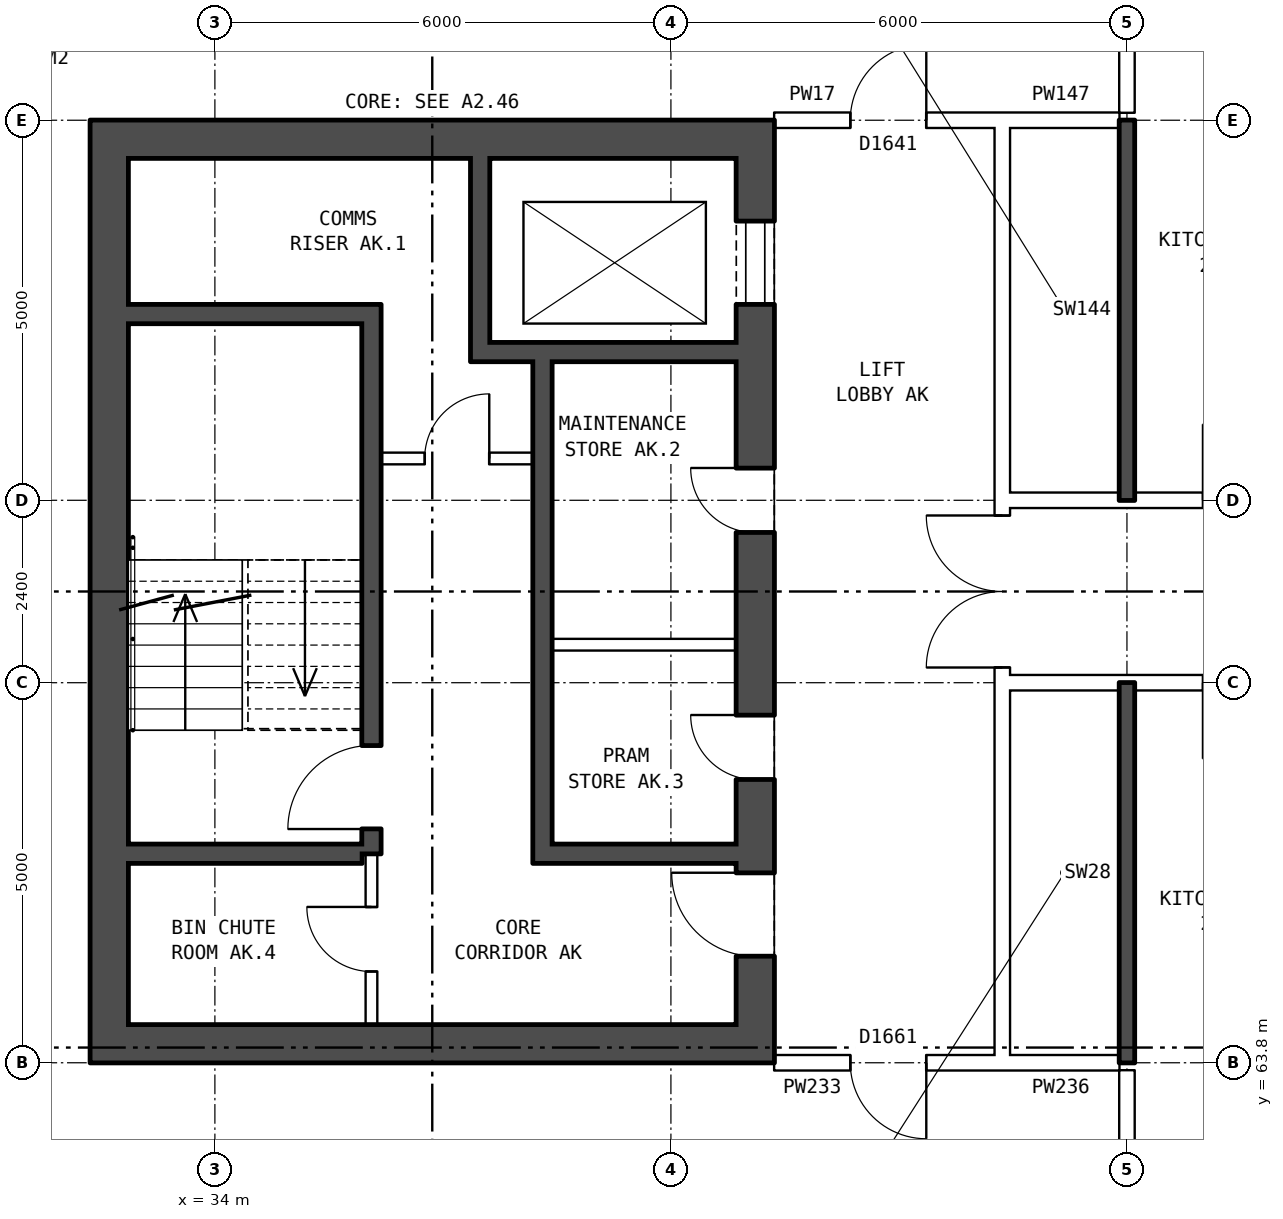
"""IFC4 building model, lengths in metres.
Left out: names, types, materials, properties, quantities, classifications, styles, units other than length and angle.
Written with IfcOpenShell. Run it as: python <this file> out.ifc"""

import sys

from ifc_helpers import new_model, si_unit, direction, frame, frame_2d, origin, place, context, subcontext, project, spatial, rectangle, extrude, element, fill, save


model = new_model("IFC4")
c1 = context("Model", 3, precision=1e-05, world=origin(), true_north=direction((0.0, 1.0)))
c2 = subcontext(c1, "Body", "Model", "MODEL_VIEW")
j1 = project(units=[si_unit("LENGTHUNIT", "METRE"), si_unit("PLANEANGLEUNIT", "RADIAN")], contexts=[c1])
p1 = place(None, origin())
s1 = spatial("IfcSite", under=j1, at=p1, CompositionType="ELEMENT")
p2 = place(p1, origin())
s2 = spatial("IfcBuilding", under=s1, at=p2, CompositionType="ELEMENT")
p3 = place(p2, frame((0.0, 0.0, 160.9)))
s3 = spatial("IfcBuildingStorey", under=s2, at=p3, CompositionType="ELEMENT", Elevation=160.9)
p4 = place(p3, frame((41.11, 76.2, 0.0), z_axis=(0.0, 0.0, 1.0), x_axis=(0.0, -1.0, 0.0)))
e1 = element("IfcWall", 1, at=p4, inside=s3, PredefinedType="SHEAR", context=c2, shape_type="SweptSolid", body=[
    extrude(rectangle(XDim=12.4, YDim=0.5, at=frame_2d((6.2, 0.0))), origin(), (0.0, 0.0, 1.0), 2.85),
])
p5 = place(p4, frame((1.325, 0.0, 0.0)))
e2 = element("IfcOpeningElement", 2, at=p5, cuts=e1, PredefinedType="OPENING", context=c2, shape_type="SweptSolid", body=[
    extrude(rectangle(XDim=1.1, YDim=2.1, at=frame_2d((0.55, 1.05))), frame((0.0, 0.26, 0.0), z_axis=(0.0, -1.0, 0.0), x_axis=(1.0, 0.0, 0.0)), (0.0, 0.0, 1.0), 0.52),
])
p6 = place(p4, frame((4.575, 0.0, 0.0)))
e3 = element("IfcOpeningElement", 3, at=p6, cuts=e1, PredefinedType="OPENING", context=c2, shape_type="SweptSolid", body=[
    extrude(rectangle(XDim=0.85, YDim=2.1, at=frame_2d((0.425, 1.05))), frame((0.0, 0.26, 0.0), z_axis=(0.0, -1.0, 0.0), x_axis=(1.0, 0.0, 0.0)), (0.0, 0.0, 1.0), 0.52),
])
p7 = place(p4, frame((7.825, 0.0, 0.0)))
e4 = element("IfcOpeningElement", 4, at=p7, cuts=e1, PredefinedType="OPENING", context=c2, shape_type="SweptSolid", body=[
    extrude(rectangle(XDim=0.85, YDim=2.1, at=frame_2d((0.425, 1.05))), frame((0.0, 0.26, 0.0), z_axis=(0.0, -1.0, 0.0), x_axis=(1.0, 0.0, 0.0)), (0.0, 0.0, 1.0), 0.52),
])
p8 = place(p4, frame((9.9, 0.0, 0.0)))
e5 = element("IfcOpeningElement", 5, at=p8, cuts=e1, PredefinedType="OPENING", context=c2, shape_type="SweptSolid", body=[
    extrude(rectangle(XDim=1.1, YDim=2.1, at=frame_2d((0.55, 1.05))), frame((0.0, 0.26, 0.0), z_axis=(0.0, -1.0, 0.0), x_axis=(1.0, 0.0, 0.0)), (0.0, 0.0, 1.0), 0.52),
])
p9 = place(p3, frame((32.61, 76.2, 0.0), z_axis=(0.0, 0.0, 1.0), x_axis=(0.0, -1.0, 0.0)))
e6 = element("IfcWall", 6, at=p9, inside=s3, PredefinedType="SHEAR", context=c2, shape_type="SweptSolid", body=[
    extrude(rectangle(XDim=12.4, YDim=0.5, at=frame_2d((6.2, 0.0))), origin(), (0.0, 0.0, 1.0), 2.85),
])
for number, where, z_axis, x_axis in (
    (7, (40.86, 75.95, 0.0), (0.0, 0.0, 1.0), (-1.0, 0.0, 0.0)),
    (8, (40.86, 64.05, 0.0), (0.0, 0.0, 1.0), (-1.0, 0.0, 0.0)),
):
    element("IfcWall", number, at=place(p3, frame(where, z_axis=z_axis, x_axis=x_axis)), inside=s3, PredefinedType="SHEAR", context=c2, shape_type="SweptSolid", body=[
        extrude(rectangle(XDim=8.0, YDim=0.5, at=frame_2d((4.0, 0.0))), origin(), (0.0, 0.0, 1.0), 2.85),
    ])
p10 = place(p3, frame((35.935, 73.65, 0.0), z_axis=(0.0, 0.0, 1.0), x_axis=(-1.0, 0.0, 0.0)))
e9 = element("IfcWall", 9, at=p10, inside=s3, PredefinedType="SHEAR", context=c2, shape_type="SweptSolid", body=[
    extrude(rectangle(XDim=3.075, YDim=0.25, at=frame_2d((1.538, 0.0))), origin(), (0.0, 0.0, 1.0), 2.85),
])
p11 = place(p3, frame((40.86, 73.15, 0.0), z_axis=(0.0, 0.0, 1.0), x_axis=(-1.0, 0.0, 0.0)))
e10 = element("IfcWall", 10, at=p11, inside=s3, PredefinedType="SHEAR", context=c2, shape_type="SweptSolid", body=[
    extrude(rectangle(XDim=3.495, YDim=0.25, at=frame_2d((1.748, 0.0))), origin(), (0.0, 0.0, 1.0), 2.85),
])
p12 = place(p3, frame((38.185, 71.75, 0.0), z_axis=(0.0, 0.0, 1.0), x_axis=(-1.0, 0.0, 0.0)))
e11 = element("IfcWall", 11, at=p12, inside=s3, PredefinedType="PARTITIONING", context=c2, shape_type="SweptSolid", body=[
    extrude(rectangle(XDim=2.0, YDim=0.15, at=frame_2d((1.0, 0.0))), origin(), (0.0, 0.0, 1.0), 2.85),
])
p13 = place(p12, frame((0.575, 0.0, 0.0)))
e12 = element("IfcOpeningElement", 12, at=p13, cuts=e11, PredefinedType="OPENING", context=c2, shape_type="SweptSolid", body=[
    extrude(rectangle(XDim=0.85, YDim=2.1, at=frame_2d((0.425, 1.05))), frame((0.0, 0.085, 0.0), z_axis=(0.0, -1.0, 0.0), x_axis=(1.0, 0.0, 0.0)), (0.0, 0.0, 1.0), 0.17),
])
p14 = place(p3, frame((40.86, 69.3, 0.0), z_axis=(0.0, 0.0, 1.0), x_axis=(-1.0, 0.0, 0.0)))
e13 = element("IfcWall", 13, at=p14, inside=s3, PredefinedType="PARTITIONING", context=c2, shape_type="SweptSolid", body=[
    extrude(rectangle(XDim=2.425, YDim=0.15, at=frame_2d((1.212, 0.0))), origin(), (0.0, 0.0, 1.0), 2.85),
])
p15 = place(p3, frame((40.86, 66.55, 0.0), z_axis=(0.0, 0.0, 1.0), x_axis=(-1.0, 0.0, 0.0)))
e14 = element("IfcWall", 14, at=p15, inside=s3, PredefinedType="SHEAR", context=c2, shape_type="SweptSolid", body=[
    extrude(rectangle(XDim=2.425, YDim=0.25, at=frame_2d((1.212, 0.0))), origin(), (0.0, 0.0, 1.0), 2.85),
])
p16 = place(p3, frame((35.935, 66.55, 0.0), z_axis=(0.0, 0.0, 1.0), x_axis=(-1.0, 0.0, 0.0)))
e15 = element("IfcWall", 15, at=p16, inside=s3, PredefinedType="SHEAR", context=c2, shape_type="SweptSolid", body=[
    extrude(rectangle(XDim=3.075, YDim=0.25, at=frame_2d((1.538, 0.0))), origin(), (0.0, 0.0, 1.0), 2.85),
])
p17 = place(p3, frame((38.31, 73.025, 0.0), z_axis=(0.0, 0.0, 1.0), x_axis=(0.0, -1.0, 0.0)))
e16 = element("IfcWall", 16, at=p17, inside=s3, PredefinedType="SHEAR", context=c2, shape_type="SweptSolid", body=[
    extrude(rectangle(XDim=6.6, YDim=0.25, at=frame_2d((3.3, 0.0))), origin(), (0.0, 0.0, 1.0), 2.85),
])
p18 = place(p3, frame((37.49, 75.7, 0.0), z_axis=(0.0, 0.0, 1.0), x_axis=(0.0, -1.0, 0.0)))
e17 = element("IfcWall", 17, at=p18, inside=s3, PredefinedType="SHEAR", context=c2, shape_type="SweptSolid", body=[
    extrude(rectangle(XDim=2.425, YDim=0.25, at=frame_2d((1.212, 0.0))), origin(), (0.0, 0.0, 1.0), 2.85),
])
p19 = place(p3, frame((36.06, 73.775, 0.0), z_axis=(0.0, 0.0, 1.0), x_axis=(0.0, -1.0, 0.0)))
e18 = element("IfcWall", 18, at=p19, inside=s3, PredefinedType="SHEAR", context=c2, shape_type="SweptSolid", body=[
    extrude(rectangle(XDim=7.225, YDim=0.25, at=frame_2d((3.612, 0.0))), origin(), (0.0, 0.0, 1.0), 2.85),
])
p20 = place(p19, frame((5.8, 0.0, 0.0)))
e19 = element("IfcOpeningElement", 19, at=p20, cuts=e18, PredefinedType="OPENING", context=c2, shape_type="SweptSolid", body=[
    extrude(rectangle(XDim=1.1, YDim=2.1, at=frame_2d((0.55, 1.05))), frame((0.0, 0.135, 0.0), z_axis=(0.0, -1.0, 0.0), x_axis=(1.0, 0.0, 0.0)), (0.0, 0.0, 1.0), 0.27),
])
p21 = place(p3, frame((36.06, 66.55, 0.0), z_axis=(0.0, 0.0, 1.0), x_axis=(0.0, -1.0, 0.0)))
e20 = element("IfcWall", 20, at=p21, inside=s3, PredefinedType="PARTITIONING", context=c2, shape_type="SweptSolid", body=[
    extrude(rectangle(XDim=2.25, YDim=0.15, at=frame_2d((1.125, 0.0))), origin(), (0.0, 0.0, 1.0), 2.85),
])
p22 = place(p21, frame((0.7, 0.0, 0.0)))
e21 = element("IfcOpeningElement", 21, at=p22, cuts=e20, PredefinedType="OPENING", context=c2, shape_type="SweptSolid", body=[
    extrude(rectangle(XDim=0.85, YDim=2.1, at=frame_2d((0.425, 1.05))), frame((0.0, 0.085, 0.0), z_axis=(0.0, -1.0, 0.0), x_axis=(1.0, 0.0, 0.0)), (0.0, 0.0, 1.0), 0.17),
])
p23 = place(p3, frame((44.36, 63.9, 0.0), z_axis=(0.0, 0.0, 1.0), x_axis=(0.0, 1.0, 0.0)))
e22 = element("IfcWall", 22, at=p23, inside=s3, PredefinedType="PARTITIONING", context=c2, shape_type="SweptSolid", body=[
    extrude(rectangle(XDim=12.2, YDim=0.2, at=frame_2d((6.1, 0.0))), origin(), (0.0, 0.0, 1.0), 2.85),
])
p24 = place(p23, frame((5.1, 0.0, 0.0)))
e23 = element("IfcOpeningElement", 23, at=p24, cuts=e22, PredefinedType="OPENING", context=c2, shape_type="SweptSolid", body=[
    extrude(rectangle(XDim=2.0, YDim=2.1, at=frame_2d((1.0, 1.05))), frame((0.0, 0.11, 0.0), z_axis=(0.0, -1.0, 0.0), x_axis=(1.0, 0.0, 0.0)), (0.0, 0.0, 1.0), 0.22),
])
p25 = place(p3, frame((41.36, 63.8, 0.0), z_axis=(0.0, 0.0, 1.0), x_axis=(1.0, 0.0, 0.0)))
e24 = element("IfcWall", 24, at=p25, inside=s3, PredefinedType="PARTITIONING", context=c2, shape_type="SweptSolid", body=[
    extrude(rectangle(XDim=3.0, YDim=0.2, at=frame_2d((1.5, 0.0))), origin(), (0.0, 0.0, 1.0), 2.85),
])
p26 = place(p25, frame((1.0, 0.0, 0.0)))
e25 = element("IfcOpeningElement", 25, at=p26, cuts=e24, PredefinedType="OPENING", context=c2, shape_type="SweptSolid", body=[
    extrude(rectangle(XDim=1.0, YDim=2.1, at=frame_2d((0.5, 1.05))), frame((0.0, 0.11, 0.0), z_axis=(0.0, -1.0, 0.0), x_axis=(1.0, 0.0, 0.0)), (0.0, 0.0, 1.0), 0.22),
])
p27 = place(p3, frame((44.36, 63.8, 0.0), z_axis=(0.0, 0.0, 1.0), x_axis=(1.0, 0.0, 0.0)))
e26 = element("IfcWall", 26, at=p27, inside=s3, PredefinedType="PARTITIONING", context=c2, shape_type="SweptSolid", body=[
    extrude(rectangle(XDim=1.54, YDim=0.2, at=frame_2d((0.77, 0.0))), origin(), (0.0, 0.0, 1.0), 2.85),
])
p28 = place(p3, frame((44.36, 68.8, 0.0), z_axis=(0.0, 0.0, 1.0), x_axis=(1.0, 0.0, 0.0)))
e27 = element("IfcWall", 27, at=p28, inside=s3, PredefinedType="PARTITIONING", context=c2, shape_type="SweptSolid", body=[
    extrude(rectangle(XDim=19.28, YDim=0.2, at=frame_2d((9.64, 0.0))), origin(), (0.0, 0.0, 1.0), 2.85),
])
p29 = place(p28, frame((17.46, 0.0, 0.0)))
e28 = element("IfcOpeningElement", 28, at=p29, cuts=e27, PredefinedType="OPENING", context=c2, shape_type="SweptSolid", body=[
    extrude(rectangle(XDim=1.0, YDim=2.1, at=frame_2d((0.5, 1.05))), frame((0.0, 0.11, 0.0), z_axis=(0.0, -1.0, 0.0), x_axis=(1.0, 0.0, 0.0)), (0.0, 0.0, 1.0), 0.22),
])
p30 = place(p28, frame((8.64, 0.0, 0.0)))
e29 = element("IfcOpeningElement", 29, at=p30, cuts=e27, PredefinedType="OPENING", context=c2, shape_type="SweptSolid", body=[
    extrude(rectangle(XDim=1.0, YDim=2.1, at=frame_2d((0.5, 1.05))), frame((0.0, 0.11, 0.0), z_axis=(0.0, -1.0, 0.0), x_axis=(1.0, 0.0, 0.0)), (0.0, 0.0, 1.0), 0.22),
])
p31 = place(p28, frame((2.64, 0.0, 0.0)))
e30 = element("IfcOpeningElement", 30, at=p31, cuts=e27, PredefinedType="OPENING", context=c2, shape_type="SweptSolid", body=[
    extrude(rectangle(XDim=1.0, YDim=2.1, at=frame_2d((0.5, 1.05))), frame((0.0, 0.11, 0.0), z_axis=(0.0, -1.0, 0.0), x_axis=(1.0, 0.0, 0.0)), (0.0, 0.0, 1.0), 0.22),
])
p32 = place(p3, frame((44.36, 71.2, 0.0), z_axis=(0.0, 0.0, 1.0), x_axis=(1.0, 0.0, 0.0)))
e31 = element("IfcWall", 31, at=p32, inside=s3, PredefinedType="PARTITIONING", context=c2, shape_type="SweptSolid", body=[
    extrude(rectangle(XDim=19.28, YDim=0.2, at=frame_2d((9.64, 0.0))), origin(), (0.0, 0.0, 1.0), 2.85),
])
p33 = place(p32, frame((17.46, 0.0, 0.0)))
e32 = element("IfcOpeningElement", 32, at=p33, cuts=e31, PredefinedType="OPENING", context=c2, shape_type="SweptSolid", body=[
    extrude(rectangle(XDim=1.0, YDim=2.1, at=frame_2d((0.5, 1.05))), frame((0.0, 0.11, 0.0), z_axis=(0.0, -1.0, 0.0), x_axis=(1.0, 0.0, 0.0)), (0.0, 0.0, 1.0), 0.22),
])
p34 = place(p32, frame((8.64, 0.0, 0.0)))
e33 = element("IfcOpeningElement", 33, at=p34, cuts=e31, PredefinedType="OPENING", context=c2, shape_type="SweptSolid", body=[
    extrude(rectangle(XDim=1.0, YDim=2.1, at=frame_2d((0.5, 1.05))), frame((0.0, 0.11, 0.0), z_axis=(0.0, -1.0, 0.0), x_axis=(1.0, 0.0, 0.0)), (0.0, 0.0, 1.0), 0.22),
])
p35 = place(p32, frame((2.64, 0.0, 0.0)))
e34 = element("IfcOpeningElement", 34, at=p35, cuts=e31, PredefinedType="OPENING", context=c2, shape_type="SweptSolid", body=[
    extrude(rectangle(XDim=1.0, YDim=2.1, at=frame_2d((0.5, 1.05))), frame((0.0, 0.11, 0.0), z_axis=(0.0, -1.0, 0.0), x_axis=(1.0, 0.0, 0.0)), (0.0, 0.0, 1.0), 0.22),
])
p36 = place(p3, frame((41.36, 76.2, 0.0), z_axis=(0.0, 0.0, 1.0), x_axis=(1.0, 0.0, 0.0)))
e35 = element("IfcWall", 35, at=p36, inside=s3, PredefinedType="PARTITIONING", context=c2, shape_type="SweptSolid", body=[
    extrude(rectangle(XDim=3.0, YDim=0.2, at=frame_2d((1.5, 0.0))), origin(), (0.0, 0.0, 1.0), 2.85),
])
p37 = place(p36, frame((1.0, 0.0, 0.0)))
e36 = element("IfcOpeningElement", 36, at=p37, cuts=e35, PredefinedType="OPENING", context=c2, shape_type="SweptSolid", body=[
    extrude(rectangle(XDim=1.0, YDim=2.1, at=frame_2d((0.5, 1.05))), frame((0.0, 0.11, 0.0), z_axis=(0.0, -1.0, 0.0), x_axis=(1.0, 0.0, 0.0)), (0.0, 0.0, 1.0), 0.22),
])
p38 = place(p3, frame((44.36, 76.2, 0.0), z_axis=(0.0, 0.0, 1.0), x_axis=(1.0, 0.0, 0.0)))
e37 = element("IfcWall", 37, at=p38, inside=s3, PredefinedType="PARTITIONING", context=c2, shape_type="SweptSolid", body=[
    extrude(rectangle(XDim=1.54, YDim=0.2, at=frame_2d((0.77, 0.0))), origin(), (0.0, 0.0, 1.0), 2.85),
])
p39 = place(p3, frame((46.0, 61.5, 0.0), z_axis=(0.0, 0.0, 1.0), x_axis=(0.0, 1.0, 0.0)))
e38 = element("IfcWall", 38, at=p39, inside=s3, PredefinedType="PARTITIONING", context=c2, shape_type="SweptSolid", body=[
    extrude(rectangle(XDim=2.2, YDim=0.2, at=frame_2d((1.1, 0.0))), origin(), (0.0, 0.0, 1.0), 2.85),
])
for number, where, z_axis, x_axis in (
    (39, (46.0, 63.8, 0.0), (0.0, 0.0, 1.0), (0.0, 1.0, 0.0)),
    (40, (46.0, 71.2, 0.0), (0.0, 0.0, 1.0), (0.0, 1.0, 0.0)),
):
    element("IfcWall", number, at=place(p3, frame(where, z_axis=z_axis, x_axis=x_axis)), inside=s3, PredefinedType="SOLIDWALL", context=c2, shape_type="SweptSolid", body=[
        extrude(rectangle(XDim=5.0, YDim=0.2, at=frame_2d((2.5, 0.0))), origin(), (0.0, 0.0, 1.0), 2.85),
    ])
p40 = place(p3, frame((46.0, 76.3, 0.0), z_axis=(0.0, 0.0, 1.0), x_axis=(0.0, 1.0, 0.0)))
e41 = element("IfcWall", 41, at=p40, inside=s3, PredefinedType="PARTITIONING", context=c2, shape_type="SweptSolid", body=[
    extrude(rectangle(XDim=2.2, YDim=0.2, at=frame_2d((1.1, 0.0))), origin(), (0.0, 0.0, 1.0), 2.85),
])
p41 = place(p5, origin())
e42 = element("IfcDoor", 42, at=p41, inside=s3, OperationType="DOUBLE_DOOR_SLIDING", PredefinedType="DOOR", context=c2, shape_type="SweptSolid", body=[
    extrude(rectangle(XDim=1.1, YDim=2.1, at=frame_2d((0.55, 1.05))), frame((0.0, -0.185, 0.0), z_axis=(0.0, -1.0, 0.0), x_axis=(1.0, 0.0, 0.0)), (0.0, 0.0, 1.0), 0.05),
])
fill(e2, e42)
p42 = place(p6, frame((0.85, 0.0, 0.0), z_axis=(0.0, 0.0, 1.0), x_axis=(-1.0, 0.0, 0.0)))
e43 = element("IfcDoor", 43, at=p42, inside=s3, OperationType="SINGLE_SWING_RIGHT", PredefinedType="DOOR", context=c2, shape_type="SweptSolid", body=[
    extrude(rectangle(XDim=0.85, YDim=2.1, at=frame_2d((0.425, 1.05))), frame((0.0, 0.235, 0.0), z_axis=(0.0, -1.0, 0.0), x_axis=(1.0, 0.0, 0.0)), (0.0, 0.0, 1.0), 0.05),
])
fill(e3, e43)
p43 = place(p7, frame((0.85, 0.0, 0.0), z_axis=(0.0, 0.0, 1.0), x_axis=(-1.0, 0.0, 0.0)))
e44 = element("IfcDoor", 44, at=p43, inside=s3, OperationType="SINGLE_SWING_RIGHT", PredefinedType="DOOR", context=c2, shape_type="SweptSolid", body=[
    extrude(rectangle(XDim=0.85, YDim=2.1, at=frame_2d((0.425, 1.05))), frame((0.0, 0.235, 0.0), z_axis=(0.0, -1.0, 0.0), x_axis=(1.0, 0.0, 0.0)), (0.0, 0.0, 1.0), 0.05),
])
fill(e4, e44)
p44 = place(p8, frame((1.1, 0.0, 0.0), z_axis=(0.0, 0.0, 1.0), x_axis=(-1.0, 0.0, 0.0)))
e45 = element("IfcDoor", 45, at=p44, inside=s3, OperationType="SINGLE_SWING_RIGHT", PredefinedType="DOOR", context=c2, shape_type="SweptSolid", body=[
    extrude(rectangle(XDim=1.1, YDim=2.1, at=frame_2d((0.55, 1.05))), frame((0.0, 0.235, 0.0), z_axis=(0.0, -1.0, 0.0), x_axis=(1.0, 0.0, 0.0)), (0.0, 0.0, 1.0), 0.05),
])
fill(e5, e45)
p45 = place(p20, frame((1.1, 0.0, 0.0), z_axis=(0.0, 0.0, 1.0), x_axis=(-1.0, 0.0, 0.0)))
e46 = element("IfcDoor", 46, at=p45, inside=s3, OperationType="SINGLE_SWING_LEFT", PredefinedType="DOOR", context=c2, shape_type="SweptSolid", body=[
    extrude(rectangle(XDim=1.1, YDim=2.1, at=frame_2d((0.55, 1.05))), frame((0.0, 0.025, 0.0), z_axis=(0.0, -1.0, 0.0), x_axis=(1.0, 0.0, 0.0)), (0.0, 0.0, 1.0), 0.05),
])
fill(e19, e46)
p46 = place(p13, frame((0.85, 0.0, 0.0), z_axis=(0.0, 0.0, 1.0), x_axis=(-1.0, 0.0, 0.0)))
e47 = element("IfcDoor", 47, at=p46, inside=s3, OperationType="SINGLE_SWING_RIGHT", PredefinedType="DOOR", context=c2, shape_type="SweptSolid", body=[
    extrude(rectangle(XDim=0.85, YDim=2.1, at=frame_2d((0.425, 1.05))), frame((0.0, 0.025, 0.0), z_axis=(0.0, -1.0, 0.0), x_axis=(1.0, 0.0, 0.0)), (0.0, 0.0, 1.0), 0.05),
])
fill(e12, e47)
p47 = place(p22, frame((0.85, 0.0, 0.0), z_axis=(0.0, 0.0, 1.0), x_axis=(-1.0, 0.0, 0.0)))
e48 = element("IfcDoor", 48, at=p47, inside=s3, OperationType="SINGLE_SWING_RIGHT", PredefinedType="DOOR", context=c2, shape_type="SweptSolid", body=[
    extrude(rectangle(XDim=0.85, YDim=2.1, at=frame_2d((0.425, 1.05))), frame((0.0, 0.025, 0.0), z_axis=(0.0, -1.0, 0.0), x_axis=(1.0, 0.0, 0.0)), (0.0, 0.0, 1.0), 0.05),
])
fill(e21, e48)
p48 = place(p24, origin())
e49 = element("IfcDoor", 49, at=p48, inside=s3, OperationType="DOUBLE_DOOR_SINGLE_SWING", PredefinedType="DOOR", context=c2, shape_type="SweptSolid", body=[
    extrude(rectangle(XDim=2.0, YDim=2.1, at=frame_2d((1.0, 1.05))), frame((0.0, 0.025, 0.0), z_axis=(0.0, -1.0, 0.0), x_axis=(1.0, 0.0, 0.0)), (0.0, 0.0, 1.0), 0.05),
])
fill(e23, e49)
p49 = place(p26, frame((1.0, 0.0, 0.0), z_axis=(0.0, 0.0, 1.0), x_axis=(-1.0, 0.0, 0.0)))
e50 = element("IfcDoor", 50, at=p49, inside=s3, OperationType="SINGLE_SWING_LEFT", PredefinedType="DOOR", context=c2, shape_type="SweptSolid", body=[
    extrude(rectangle(XDim=1.0, YDim=2.1, at=frame_2d((0.5, 1.05))), frame((0.0, 0.025, 0.0), z_axis=(0.0, -1.0, 0.0), x_axis=(1.0, 0.0, 0.0)), (0.0, 0.0, 1.0), 0.05),
])
fill(e25, e50)
p50 = place(p37, origin())
e51 = element("IfcDoor", 51, at=p50, inside=s3, OperationType="SINGLE_SWING_RIGHT", PredefinedType="DOOR", context=c2, shape_type="SweptSolid", body=[
    extrude(rectangle(XDim=1.0, YDim=2.1, at=frame_2d((0.5, 1.05))), frame((0.0, 0.025, 0.0), z_axis=(0.0, -1.0, 0.0), x_axis=(1.0, 0.0, 0.0)), (0.0, 0.0, 1.0), 0.05),
])
fill(e36, e51)
save(model, sys.argv[1])
